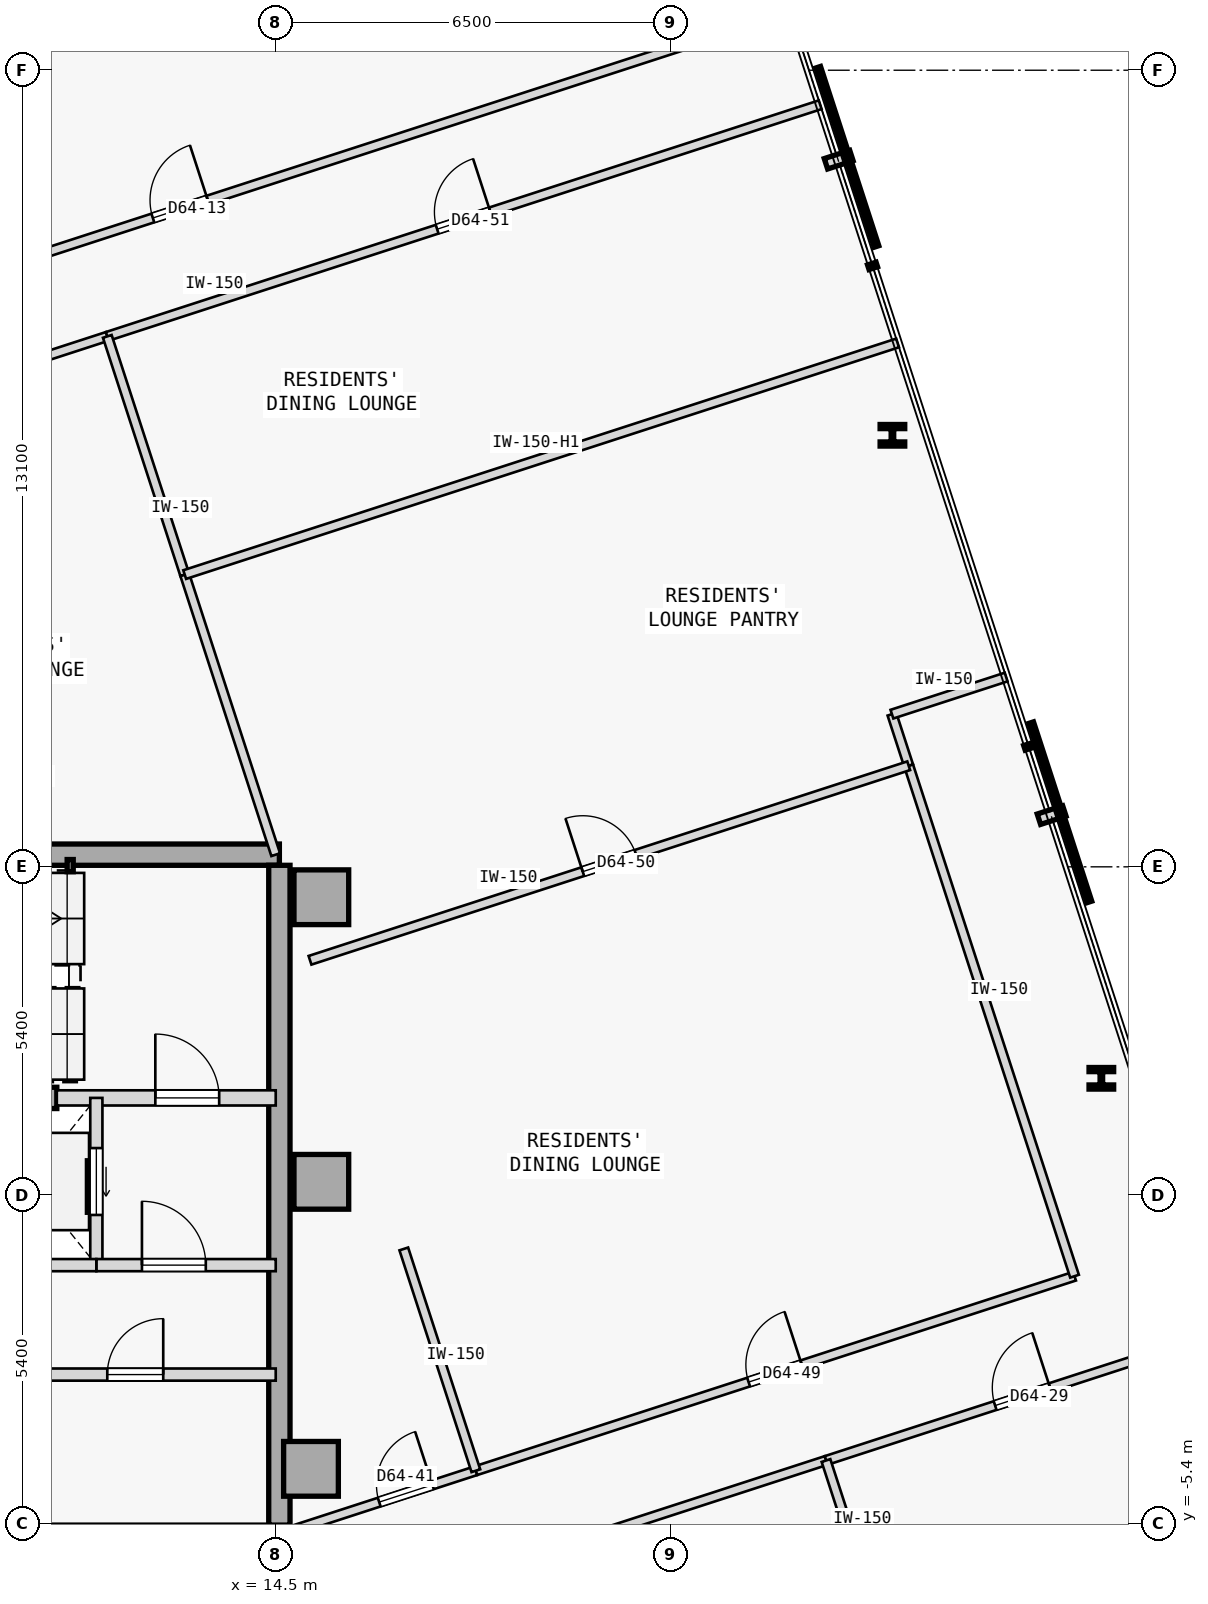
"""IFC4 building model, lengths in metres.
Left out: names, types, materials, properties, quantities, classifications, styles, units other than length and angle.
Written with IfcOpenShell. Run it as: python <this file> out.ifc"""

import sys

from ifc_helpers import new_model, si_unit, direction, frame, frame_2d, origin, origin_2d, place, context, subcontext, project, spatial, rectangle, hollow_rectangle, i_section, extrude, element, fill, save


model = new_model("IFC4")
c1 = context("Model", 3, precision=1e-05, world=origin(), true_north=direction((0.0, 1.0)))
c2 = subcontext(c1, "Body", "Model", "MODEL_VIEW")
j1 = project(units=[si_unit("LENGTHUNIT", "METRE"), si_unit("PLANEANGLEUNIT", "RADIAN")], contexts=[c1])
p1 = place(None, origin())
s1 = spatial("IfcSite", under=j1, at=p1, CompositionType="ELEMENT")
p2 = place(p1, origin())
s2 = spatial("IfcBuilding", under=s1, at=p2, CompositionType="ELEMENT")
p3 = place(p2, frame((0.0, 0.0, 241.05)))
s3 = spatial("IfcBuildingStorey", under=s2, at=p3, CompositionType="ELEMENT", Elevation=241.05)
for number, where, z_axis, x_axis in (
    (1, (15.25, 4.9, 0.0), (0.0, 0.0, 1.0), (1.0, 0.0, 0.0)),
    (2, (15.25, 0.22, 0.0), (0.0, 0.0, 1.0), (1.0, 0.0, 0.0)),
    (3, (15.08, -4.5, 0.0), (0.0, 0.0, 1.0), (1.0, 0.0, 0.0)),
):
    element("IfcColumn", number, at=place(p3, frame(where, z_axis=z_axis, x_axis=x_axis)), inside=s3, PredefinedType="COLUMN", context=c2, shape_type="SweptSolid", body=[
        extrude(rectangle(XDim=0.9, YDim=0.9, at=origin_2d()), origin(), (0.0, 0.0, 1.0), 3.35),
    ])
p4 = place(p3, frame((3.15, 5.6, 0.0), z_axis=(0.0, 0.0, 1.0), x_axis=(1.0, 0.0, 0.0)))
e4 = element("IfcWall", 4, at=p4, inside=s3, PredefinedType="SHEAR", context=c2, shape_type="SweptSolid", body=[
    extrude(rectangle(XDim=11.41, YDim=0.35, at=frame_2d((5.705, 0.0))), origin(), (0.0, 0.0, 1.0), 3.125),
])
p5 = place(p3, frame((14.56, -5.425, 0.0), z_axis=(0.0, 0.0, 1.0), x_axis=(0.0, 1.0, 0.0)))
e5 = element("IfcWall", 5, at=p5, inside=s3, PredefinedType="SHEAR", context=c2, shape_type="SweptSolid", body=[
    extrude(rectangle(XDim=10.85, YDim=0.35, at=frame_2d((5.425, 0.0))), origin(), (0.0, 0.0, 1.0), 3.125),
])
p6 = place(p3, frame((5.75, 1.6, 0.0), z_axis=(0.0, 0.0, 1.0), x_axis=(1.0, 0.0, 0.0)))
e6 = element("IfcWall", 6, at=p6, inside=s3, PredefinedType="SHEAR", context=c2, shape_type="SweptSolid", body=[
    extrude(rectangle(XDim=5.15, YDim=0.35, at=frame_2d((2.575, 0.0))), origin(), (0.0, 0.0, 1.0), 3.125),
])
p7 = place(p3, frame((11.12, 5.42, 0.0), z_axis=(0.0, 0.0, 1.0), x_axis=(1.0, 0.0, 0.0)))
e7 = element("IfcColumn", 7, at=p7, inside=s3, PredefinedType="COLUMN", context=c2, shape_type="SweptSolid", body=[
    extrude(hollow_rectangle(XDim=0.1, YDim=0.2, WallThickness=0.008, at=origin_2d()), origin(), (0.0, 0.0, 1.0), 3.35),
])
for number, where, z_axis, x_axis in (
    (8, (28.078, 1.922, 0.0), (0.0, 0.0, 1.0), (1.0, 0.0, 0.0)),
    (9, (24.642, 12.497, 0.0), (0.0, 0.0, 1.0), (1.0, 0.0, 0.0)),
):
    element("IfcColumn", number, at=place(p3, frame(where, z_axis=z_axis, x_axis=x_axis)), inside=s3, PredefinedType="COLUMN", context=c2, shape_type="SweptSolid", body=[
        extrude(i_section(OverallWidth=0.405, OverallDepth=0.355, WebThickness=0.042, FlangeThickness=0.068, FilletRadius=0.015, at=origin_2d()), origin(), (0.0, 0.0, 1.0), 3.35),
    ])
p8 = place(p3, frame((10.9, 1.6, 0.0), z_axis=(0.0, 0.0, 1.0), x_axis=(1.0, 0.0, 0.0)))
e10 = element("IfcWall", 10, at=p8, inside=s3, PredefinedType="STANDARD", context=c2, shape_type="SweptSolid", body=[
    extrude(rectangle(XDim=3.6, YDim=0.25, at=frame_2d((1.8, 0.0))), origin(), (0.0, 0.0, 1.0), 3.125),
])
p9 = place(p8, frame((1.62, 0.0, 0.0)))
e11 = element("IfcOpeningElement", 11, at=p9, cuts=e10, PredefinedType="OPENING", context=c2, shape_type="SweptSolid", body=[
    extrude(rectangle(XDim=1.05, YDim=2.15, at=frame_2d((0.525, 1.075))), frame((0.0, 0.135, 0.0), z_axis=(0.0, -1.0, 0.0), x_axis=(1.0, 0.0, 0.0)), (0.0, 0.0, 1.0), 0.27),
])
p10 = place(p3, frame((11.55, -1.15, 0.0), z_axis=(0.0, 0.0, 1.0), x_axis=(0.0, 1.0, 0.0)))
e12 = element("IfcWall", 12, at=p10, inside=s3, PredefinedType="STANDARD", context=c2, shape_type="SweptSolid", body=[
    extrude(rectangle(XDim=2.75, YDim=0.2, at=frame_2d((1.375, 0.0))), origin(), (0.0, 0.0, 1.0), 3.125),
])
p11 = place(p10, frame((0.825, 0.0, 0.0)))
e13 = element("IfcOpeningElement", 13, at=p11, cuts=e12, PredefinedType="OPENING", context=c2, shape_type="SweptSolid", body=[
    extrude(rectangle(XDim=1.1, YDim=2.15, at=frame_2d((0.55, 1.075))), frame((0.0, 0.11, 0.0), z_axis=(0.0, -1.0, 0.0), x_axis=(1.0, 0.0, 0.0)), (0.0, 0.0, 1.0), 0.22),
])
p12 = place(p3, frame((11.55, -1.15, 0.0), z_axis=(0.0, 0.0, 1.0), x_axis=(1.0, 0.0, 0.0)))
e14 = element("IfcWall", 14, at=p12, inside=s3, PredefinedType="STANDARD", context=c2, shape_type="SweptSolid", body=[
    extrude(rectangle(XDim=2.95, YDim=0.2, at=frame_2d((1.475, 0.0))), origin(), (0.0, 0.0, 1.0), 3.125),
])
p13 = place(p12, frame((0.75, 0.0, 0.0)))
e15 = element("IfcOpeningElement", 15, at=p13, cuts=e14, PredefinedType="OPENING", context=c2, shape_type="SweptSolid", body=[
    extrude(rectangle(XDim=1.05, YDim=2.18, at=frame_2d((0.525, 1.09))), frame((0.0, 0.11, 0.0), z_axis=(0.0, -1.0, 0.0), x_axis=(1.0, 0.0, 0.0)), (0.0, 0.0, 1.0), 0.22),
])
p14 = place(p3, frame((9.35, -1.15, 0.0), z_axis=(0.0, 0.0, 1.0), x_axis=(1.0, 0.0, 0.0)))
e16 = element("IfcWall", 16, at=p14, inside=s3, PredefinedType="STANDARD", context=c2, shape_type="SweptSolid", body=[
    extrude(rectangle(XDim=2.2, YDim=0.2, at=frame_2d((1.1, 0.0))), origin(), (0.0, 0.0, 1.0), 3.125),
])
p15 = place(p3, frame((3.7, -2.95, 0.0), z_axis=(0.0, 0.0, 1.0), x_axis=(1.0, 0.0, 0.0)))
e17 = element("IfcWall", 17, at=p15, inside=s3, PredefinedType="STANDARD", context=c2, shape_type="SweptSolid", body=[
    extrude(rectangle(XDim=10.8, YDim=0.2, at=frame_2d((5.4, 0.0))), origin(), (0.0, 0.0, 1.0), 3.125),
])
p16 = place(p15, frame((0.53, 0.0, 0.0)))
e18 = element("IfcOpeningElement", 18, at=p16, cuts=e17, PredefinedType="OPENING", context=c2, shape_type="SweptSolid", body=[
    extrude(rectangle(XDim=1.1, YDim=2.15, at=frame_2d((0.55, 1.075))), frame((0.0, 0.11, 0.0), z_axis=(0.0, -1.0, 0.0), x_axis=(1.0, 0.0, 0.0)), (0.0, 0.0, 1.0), 0.22),
])
p17 = place(p15, frame((3.71, 0.0, 0.0)))
e19 = element("IfcOpeningElement", 19, at=p17, cuts=e17, PredefinedType="OPENING", context=c2, shape_type="SweptSolid", body=[
    extrude(rectangle(XDim=0.92, YDim=2.15, at=frame_2d((0.46, 1.075))), frame((0.0, 0.11, 0.0), z_axis=(0.0, -1.0, 0.0), x_axis=(1.0, 0.0, 0.0)), (0.0, 0.0, 1.0), 0.22),
])
p18 = place(p15, frame((8.03, 0.0, 0.0)))
e20 = element("IfcOpeningElement", 20, at=p18, cuts=e17, PredefinedType="OPENING", context=c2, shape_type="SweptSolid", body=[
    extrude(rectangle(XDim=0.92, YDim=2.15, at=frame_2d((0.46, 1.075))), frame((0.0, 0.11, 0.0), z_axis=(0.0, -1.0, 0.0), x_axis=(1.0, 0.0, 0.0)), (0.0, 0.0, 1.0), 0.22),
])
p19 = place(p3, frame((2.909, 12.96, 0.0), z_axis=(0.0, 0.0, 1.0), x_axis=(0.951056113966, 0.309018232614, 0.0)))
e21 = element("IfcWall", 21, at=p19, inside=s3, PredefinedType="PARTITIONING", context=c2, shape_type="SweptSolid", body=[
    extrude(rectangle(XDim=21.076, YDim=0.15, at=frame_2d((10.538, 0.0))), origin(), (0.0, 0.0, 1.0), 3.125),
])
p20 = place(p19, frame((10.063, 0.0, 0.0)))
e22 = element("IfcOpeningElement", 22, at=p20, cuts=e21, PredefinedType="OPENING", context=c2, shape_type="SweptSolid", body=[
    extrude(rectangle(XDim=0.95, YDim=2.15, at=frame_2d((0.475, 1.075))), frame((0.0, 0.085, 0.0), z_axis=(0.0, -1.0, 0.0), x_axis=(1.0, 0.0, 0.0)), (0.0, 0.0, 1.0), 0.17),
])
p21 = place(p3, frame((23.549, -4.363, 0.0), z_axis=(0.0, 0.0, 1.0), x_axis=(0.951054649174, 0.309022740723, 0.0)))
e23 = element("IfcWall", 23, at=p21, inside=s3, PredefinedType="PARTITIONING", context=c2, shape_type="SweptSolid", body=[
    extrude(rectangle(XDim=6.799, YDim=0.15, at=frame_2d((3.399, 0.0))), origin(), (0.0, 0.0, 1.0), 3.125),
])
p22 = place(p21, frame((2.925, 0.0, 0.0)))
e24 = element("IfcOpeningElement", 24, at=p22, cuts=e23, PredefinedType="OPENING", context=c2, shape_type="SweptSolid", body=[
    extrude(rectangle(XDim=0.95, YDim=2.15, at=frame_2d((0.475, 1.075))), frame((0.0, 0.085, 0.0), z_axis=(0.0, -1.0, 0.0), x_axis=(1.0, 0.0, 0.0)), (0.0, 0.0, 1.0), 0.17),
])
p23 = place(p3, frame((19.412, -5.708, 0.0), z_axis=(0.0, 0.0, 1.0), x_axis=(0.951057987102, 0.309012467661, 0.0)))
e25 = element("IfcWall", 25, at=p23, inside=s3, PredefinedType="PARTITIONING", context=c2, shape_type="SweptSolid", body=[
    extrude(rectangle(XDim=4.35, YDim=0.15, at=frame_2d((2.175, 0.0))), origin(), (0.0, 0.0, 1.0), 3.125),
])
p24 = place(p3, frame((14.5, -5.6, 0.0), z_axis=(0.0, 0.0, 1.0), x_axis=(0.951047546178, 0.309044600193, 0.0)))
e26 = element("IfcWall", 26, at=p24, inside=s3, PredefinedType="PARTITIONING", context=c2, shape_type="SweptSolid", body=[
    extrude(rectangle(XDim=3.461, YDim=0.15, at=frame_2d((1.73, 0.0))), origin(), (0.0, 0.0, 1.0), 3.125),
])
p25 = place(p24, frame((1.79, 0.0, 0.0)))
e27 = element("IfcOpeningElement", 27, at=p25, cuts=e26, PredefinedType="OPENING", context=c2, shape_type="SweptSolid", body=[
    extrude(rectangle(XDim=0.92, YDim=2.15, at=frame_2d((0.46, 1.075))), frame((0.0, 0.085, 0.0), z_axis=(0.0, -1.0, 0.0), x_axis=(1.0, 0.0, 0.0)), (0.0, 0.0, 1.0), 0.17),
])
p26 = place(p3, frame((5.479, 12.092, 0.0), z_axis=(0.0, 0.0, 1.0), x_axis=(0.951051809397, 0.309031480343, 0.0)))
e28 = element("IfcWall", 28, at=p26, inside=s3, PredefinedType="PARTITIONING", context=c2, shape_type="SweptSolid", body=[
    extrude(rectangle(XDim=6.573, YDim=0.15, at=frame_2d((3.287, 0.0))), origin(), (0.0, 0.0, 1.0), 3.125),
])
p27 = place(p26, frame((2.826, 0.0, 0.0)))
e29 = element("IfcOpeningElement", 29, at=p27, cuts=e28, PredefinedType="OPENING", context=c2, shape_type="SweptSolid", body=[
    extrude(rectangle(XDim=0.92, YDim=2.15, at=frame_2d((0.46, 1.075))), frame((0.0, 0.085, 0.0), z_axis=(0.0, -1.0, 0.0), x_axis=(1.0, 0.0, 0.0)), (0.0, 0.0, 1.0), 0.17),
])
p28 = place(p3, frame((17.791, -4.531, 0.0), z_axis=(0.0, 0.0, 1.0), x_axis=(0.951056769902, 0.309016213852, 0.0)))
e30 = element("IfcWall", 30, at=p28, inside=s3, PredefinedType="PARTITIONING", context=c2, shape_type="SweptSolid", body=[
    extrude(rectangle(XDim=10.352, YDim=0.15, at=frame_2d((5.176, 0.0))), origin(), (0.0, 0.0, 1.0), 3.125),
])
p29 = place(p28, frame((4.716, 0.0, 0.0)))
e31 = element("IfcOpeningElement", 31, at=p29, cuts=e30, PredefinedType="OPENING", context=c2, shape_type="SweptSolid", body=[
    extrude(rectangle(XDim=0.92, YDim=2.15, at=frame_2d((0.46, 1.075))), frame((0.0, 0.085, 0.0), z_axis=(0.0, -1.0, 0.0), x_axis=(1.0, 0.0, 0.0)), (0.0, 0.0, 1.0), 0.17),
])
p30 = place(p3, frame((27.637, -1.332, 0.0), z_axis=(0.0, 0.0, 1.0), x_axis=(-0.309040411618, 0.951048907253, 0.0)))
e32 = element("IfcWall", 32, at=p30, inside=s3, PredefinedType="PARTITIONING", context=c2, shape_type="SweptSolid", body=[
    extrude(rectangle(XDim=8.826, YDim=0.15, at=frame_2d((4.413, 0.0))), origin(), (0.0, 0.0, 1.0), 3.125),
])
p31 = place(p3, frame((24.909, 7.062, 0.0), z_axis=(0.0, 0.0, 1.0), x_axis=(-0.30899324298, 0.951064233263, 0.0)))
e33 = element("IfcWall", 33, at=p31, inside=s3, PredefinedType="PARTITIONING", context=c2, shape_type="SweptSolid", body=[
    extrude(rectangle(XDim=0.892, YDim=0.15, at=frame_2d((0.446, 0.0))), origin(), (0.0, 0.0, 1.0), 3.125),
])
p32 = place(p3, frame((24.634, 7.91, 0.0), z_axis=(0.0, 0.0, 1.0), x_axis=(0.951054051148, 0.309024581215, 0.0)))
e34 = element("IfcWall", 34, at=p32, inside=s3, PredefinedType="PARTITIONING", context=c2, shape_type="SweptSolid", body=[
    extrude(rectangle(XDim=1.975, YDim=0.15, at=frame_2d((0.988, 0.0))), origin(), (0.0, 0.0, 1.0), 3.125),
])
p33 = place(p3, frame((11.73, 14.123, 0.0), z_axis=(0.0, 0.0, 1.0), x_axis=(0.951060263663, 0.309005460926, 0.0)))
e35 = element("IfcWall", 35, at=p33, inside=s3, PredefinedType="PARTITIONING", context=c2, shape_type="SweptSolid", body=[
    extrude(rectangle(XDim=12.327, YDim=0.15, at=frame_2d((6.164, 0.0))), origin(), (0.0, 0.0, 1.0), 3.125),
])
p34 = place(p33, frame((5.704, 0.0, 0.0)))
e36 = element("IfcOpeningElement", 36, at=p34, cuts=e35, PredefinedType="OPENING", context=c2, shape_type="SweptSolid", body=[
    extrude(rectangle(XDim=0.92, YDim=2.15, at=frame_2d((0.46, 1.075))), frame((0.0, 0.085, 0.0), z_axis=(0.0, -1.0, 0.0), x_axis=(1.0, 0.0, 0.0)), (0.0, 0.0, 1.0), 0.17),
])
p35 = place(p3, frame((24.229, -6.456, 0.0), z_axis=(0.0, 0.0, 1.0), x_axis=(-0.309060979314, 0.951042223598, 0.0)))
e37 = element("IfcWall", 37, at=p35, inside=s3, PredefinedType="PARTITIONING", context=c2, shape_type="SweptSolid", body=[
    extrude(rectangle(XDim=2.2, YDim=0.15, at=frame_2d((1.1, 0.0))), origin(), (0.0, 0.0, 1.0), 3.125),
])
p36 = place(p3, frame((17.791, -4.531, 0.0), z_axis=(0.0, 0.0, 1.0), x_axis=(-0.309018414265, 0.951056054944, 0.0)))
e38 = element("IfcWall", 38, at=p36, inside=s3, PredefinedType="PARTITIONING", context=c2, shape_type="SweptSolid", body=[
    extrude(rectangle(XDim=3.835, YDim=0.15, at=frame_2d((1.917, 0.0))), origin(), (0.0, 0.0, 1.0), 3.125),
])
p37 = place(p3, frame((14.5, 5.6, 0.0), z_axis=(0.0, 0.0, 1.0), x_axis=(-0.308974360462, 0.951070367837, 0.0)))
e39 = element("IfcWall", 39, at=p37, inside=s3, PredefinedType="PARTITIONING", context=c2, shape_type="SweptSolid", body=[
    extrude(rectangle(XDim=4.843, YDim=0.15, at=frame_2d((2.421, 0.0))), origin(), (0.0, 0.0, 1.0), 3.125),
])
p38 = place(p3, frame((13.003, 10.206, 0.0), z_axis=(0.0, 0.0, 1.0), x_axis=(-0.309035144366, 0.951050618814, 0.0)))
e40 = element("IfcWall", 40, at=p38, inside=s3, PredefinedType="PARTITIONING", context=c2, shape_type="SweptSolid", body=[
    extrude(rectangle(XDim=4.119, YDim=0.15, at=frame_2d((2.06, 0.0))), origin(), (0.0, 0.0, 1.0), 3.125),
])
p39 = place(p3, frame((15.064, 3.863, 0.0), z_axis=(0.0, 0.0, 1.0), x_axis=(0.951061448945, 0.309001812827, 0.0)))
e41 = element("IfcWall", 41, at=p39, inside=s3, PredefinedType="PARTITIONING", context=c2, shape_type="SweptSolid", body=[
    extrude(rectangle(XDim=10.352, YDim=0.15, at=frame_2d((5.176, 0.0))), origin(), (0.0, 0.0, 1.0), 3.125),
])
p40 = place(p39, frame((4.716, 0.0, 0.0)))
e42 = element("IfcOpeningElement", 42, at=p40, cuts=e41, PredefinedType="OPENING", context=c2, shape_type="SweptSolid", body=[
    extrude(rectangle(XDim=0.92, YDim=2.15, at=frame_2d((0.46, 1.075))), frame((0.0, 0.085, 0.0), z_axis=(0.0, -1.0, 0.0), x_axis=(1.0, 0.0, 0.0)), (0.0, 0.0, 1.0), 0.17),
])
p41 = place(p3, frame((13.003, 10.206, 0.0), z_axis=(0.0, 0.0, 1.0), x_axis=(0.951060263663, 0.309005460926, 0.0)))
e43 = element("IfcWall", 43, at=p41, inside=s3, PredefinedType="PARTITIONING", context=c2, shape_type="SweptSolid", body=[
    extrude(rectangle(XDim=12.327, YDim=0.15, at=frame_2d((6.164, 0.0))), origin(), (0.0, 0.0, 1.0), 2.675),
])
p42 = place(p9, origin())
e44 = element("IfcDoor", 44, at=p42, inside=s3, OperationType="SINGLE_SWING_LEFT", PredefinedType="DOOR", context=c2, shape_type="SweptSolid", body=[
    extrude(rectangle(XDim=1.05, YDim=2.15, at=frame_2d((0.525, 1.075))), frame((0.0, 0.025, 0.0), z_axis=(0.0, -1.0, 0.0), x_axis=(1.0, 0.0, 0.0)), (0.0, 0.0, 1.0), 0.05),
])
fill(e11, e44)
p43 = place(p13, origin())
e45 = element("IfcDoor", 45, at=p43, inside=s3, OperationType="SINGLE_SWING_LEFT", PredefinedType="DOOR", context=c2, shape_type="SweptSolid", body=[
    extrude(rectangle(XDim=1.05, YDim=2.18, at=frame_2d((0.525, 1.09))), frame((0.0, 0.025, 0.0), z_axis=(0.0, -1.0, 0.0), x_axis=(1.0, 0.0, 0.0)), (0.0, 0.0, 1.0), 0.05),
])
fill(e15, e45)
p44 = place(p11, origin())
e46 = element("IfcDoor", 46, at=p44, inside=s3, OperationType="SLIDING_TO_RIGHT", PredefinedType="DOOR", context=c2, shape_type="SweptSolid", body=[
    extrude(rectangle(XDim=1.1, YDim=2.15, at=frame_2d((0.55, 1.075))), frame((0.0, 0.025, 0.0), z_axis=(0.0, -1.0, 0.0), x_axis=(1.0, 0.0, 0.0)), (0.0, 0.0, 1.0), 0.05),
])
fill(e13, e46)
p45 = place(p18, origin())
e47 = element("IfcDoor", 47, at=p45, inside=s3, OperationType="SINGLE_SWING_RIGHT", PredefinedType="DOOR", context=c2, shape_type="SweptSolid", body=[
    extrude(rectangle(XDim=0.92, YDim=2.15, at=frame_2d((0.46, 1.075))), frame((0.0, 0.025, 0.0), z_axis=(0.0, -1.0, 0.0), x_axis=(1.0, 0.0, 0.0)), (0.0, 0.0, 1.0), 0.05),
])
fill(e20, e47)
p46 = place(p20, origin())
e48 = element("IfcDoor", 48, at=p46, inside=s3, OperationType="SINGLE_SWING_RIGHT", PredefinedType="DOOR", context=c2, shape_type="SweptSolid", body=[
    extrude(rectangle(XDim=0.95, YDim=2.15, at=frame_2d((0.475, 1.075))), frame((0.0, 0.025, 0.0), z_axis=(0.0, -1.0, 0.0), x_axis=(1.0, 0.0, 0.0)), (0.0, 0.0, 1.0), 0.05),
])
fill(e22, e48)
p47 = place(p22, origin())
e49 = element("IfcDoor", 49, at=p47, inside=s3, OperationType="SINGLE_SWING_RIGHT", PredefinedType="DOOR", context=c2, shape_type="SweptSolid", body=[
    extrude(rectangle(XDim=0.95, YDim=2.15, at=frame_2d((0.475, 1.075))), frame((0.0, 0.025, 0.0), z_axis=(0.0, -1.0, 0.0), x_axis=(1.0, 0.0, 0.0)), (0.0, 0.0, 1.0), 0.05),
])
fill(e24, e49)
p48 = place(p25, origin())
e50 = element("IfcDoor", 50, at=p48, inside=s3, OperationType="SINGLE_SWING_RIGHT", PredefinedType="DOOR", context=c2, shape_type="SweptSolid", body=[
    extrude(rectangle(XDim=0.92, YDim=2.15, at=frame_2d((0.46, 1.075))), frame((0.0, 0.025, 0.0), z_axis=(0.0, -1.0, 0.0), x_axis=(1.0, 0.0, 0.0)), (0.0, 0.0, 1.0), 0.05),
])
fill(e27, e50)
p49 = place(p29, origin())
e51 = element("IfcDoor", 51, at=p49, inside=s3, OperationType="SINGLE_SWING_RIGHT", PredefinedType="DOOR", context=c2, shape_type="SweptSolid", body=[
    extrude(rectangle(XDim=0.92, YDim=2.15, at=frame_2d((0.46, 1.075))), frame((0.0, 0.025, 0.0), z_axis=(0.0, -1.0, 0.0), x_axis=(1.0, 0.0, 0.0)), (0.0, 0.0, 1.0), 0.05),
])
fill(e31, e51)
p50 = place(p40, origin())
e52 = element("IfcDoor", 52, at=p50, inside=s3, OperationType="SINGLE_SWING_LEFT", PredefinedType="DOOR", context=c2, shape_type="SweptSolid", body=[
    extrude(rectangle(XDim=0.92, YDim=2.15, at=frame_2d((0.46, 1.075))), frame((0.0, 0.025, 0.0), z_axis=(0.0, -1.0, 0.0), x_axis=(1.0, 0.0, 0.0)), (0.0, 0.0, 1.0), 0.05),
])
fill(e42, e52)
p51 = place(p34, origin())
e53 = element("IfcDoor", 53, at=p51, inside=s3, OperationType="SINGLE_SWING_RIGHT", PredefinedType="DOOR", context=c2, shape_type="SweptSolid", body=[
    extrude(rectangle(XDim=0.92, YDim=2.15, at=frame_2d((0.46, 1.075))), frame((0.0, 0.025, 0.0), z_axis=(0.0, -1.0, 0.0), x_axis=(1.0, 0.0, 0.0)), (0.0, 0.0, 1.0), 0.05),
])
fill(e36, e53)
save(model, sys.argv[1])
